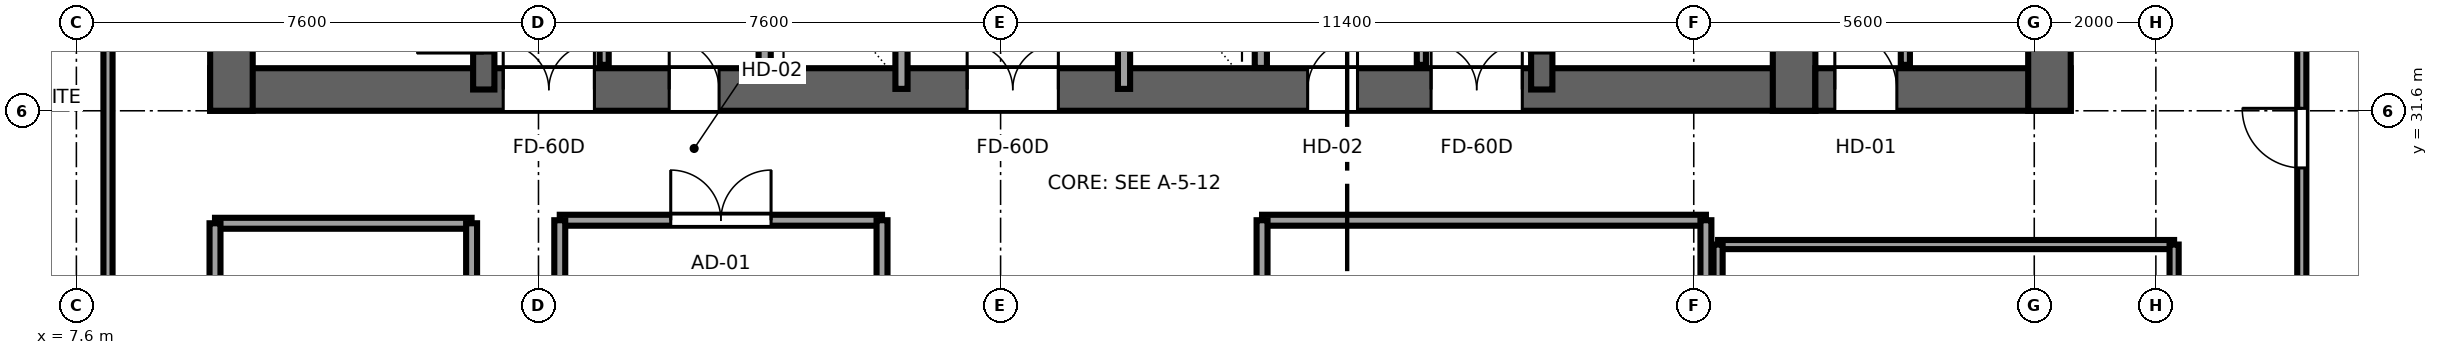
"""IFC4 building model, lengths in metres.
Left out: names, types, materials, properties, quantities, classifications, styles, units other than length and angle.
Written with IfcOpenShell. Run it as: python <this file> out.ifc"""

import sys

from ifc_helpers import new_model, si_unit, direction, frame, frame_2d, origin, place, context, subcontext, project, spatial, rectangle, extrude, source, transform, mapped, element, fill, save


model = new_model("IFC4")
c1 = context("Model", 3, precision=1e-05, world=origin(), true_north=direction((0.0, 1.0)))
c2 = subcontext(c1, "Body", "Model", "MODEL_VIEW")
j1 = project(units=[si_unit("LENGTHUNIT", "METRE"), si_unit("PLANEANGLEUNIT", "RADIAN")], contexts=[c1])
p1 = place(None, origin())
s1 = spatial("IfcSite", under=j1, at=p1, CompositionType="ELEMENT")
p2 = place(p1, origin())
s2 = spatial("IfcBuilding", under=s1, at=p2, CompositionType="ELEMENT")
p3 = place(p2, frame((0.0, 0.0, 179.0)))
s3 = spatial("IfcBuildingStorey", under=s2, at=p3, CompositionType="ELEMENT", Elevation=179.0)
p4 = place(p3, frame((9.8, 31.95, 0.0), z_axis=(0.0, 0.0, 1.0), x_axis=(1.0, 0.0, 0.0)))
e1 = element("IfcWall", 1, at=p4, inside=s3, PredefinedType="SHEAR", context=c2, shape_type="SweptSolid", body=[
    extrude(rectangle(XDim=26.4, YDim=0.7, at=frame_2d((13.2, 0.0))), origin(), (0.0, 0.0, 1.0), 3.55),
])
p5 = place(p4, frame((6.32, 0.0, 0.0), z_axis=(0.0, 0.0, 1.0), x_axis=(-1.0, 0.0, 0.0)))
e2 = element("IfcOpeningElement", 2, at=p5, cuts=e1, PredefinedType="OPENING", context=c2, shape_type="SweptSolid", body=[
    extrude(rectangle(XDim=1.5, YDim=2.04, at=frame_2d((0.75, 1.02))), frame((0.0, 0.36, 0.0), z_axis=(0.0, -1.0, 0.0), x_axis=(1.0, 0.0, 0.0)), (0.0, 0.0, 1.0), 0.72),
])
p6 = place(p4, frame((13.95, 0.0, 0.0), z_axis=(0.0, 0.0, 1.0), x_axis=(-1.0, 0.0, 0.0)))
e3 = element("IfcOpeningElement", 3, at=p6, cuts=e1, PredefinedType="OPENING", context=c2, shape_type="SweptSolid", body=[
    extrude(rectangle(XDim=1.5, YDim=2.04, at=frame_2d((0.75, 1.02))), frame((0.0, 0.36, 0.0), z_axis=(0.0, -1.0, 0.0), x_axis=(1.0, 0.0, 0.0)), (0.0, 0.0, 1.0), 0.72),
])
p7 = place(p4, frame((21.58, 0.0, 0.0), z_axis=(0.0, 0.0, 1.0), x_axis=(-1.0, 0.0, 0.0)))
e4 = element("IfcOpeningElement", 4, at=p7, cuts=e1, PredefinedType="OPENING", context=c2, shape_type="SweptSolid", body=[
    extrude(rectangle(XDim=1.5, YDim=2.04, at=frame_2d((0.75, 1.02))), frame((0.0, 0.36, 0.0), z_axis=(0.0, -1.0, 0.0), x_axis=(1.0, 0.0, 0.0)), (0.0, 0.0, 1.0), 0.72),
])
p8 = place(p4, frame((8.37, 0.0, 0.0), z_axis=(0.0, 0.0, 1.0), x_axis=(-1.0, 0.0, 0.0)))
e5 = element("IfcOpeningElement", 5, at=p8, cuts=e1, PredefinedType="OPENING", context=c2, shape_type="SweptSolid", body=[
    extrude(rectangle(XDim=0.82, YDim=2.01, at=frame_2d((0.41, 1.005))), frame((0.0, 0.36, 0.0), z_axis=(0.0, -1.0, 0.0), x_axis=(1.0, 0.0, 0.0)), (0.0, 0.0, 1.0), 0.72),
])
p9 = place(p4, frame((18.87, 0.0, 0.0), z_axis=(0.0, 0.0, 1.0), x_axis=(-1.0, 0.0, 0.0)))
e6 = element("IfcOpeningElement", 6, at=p9, cuts=e1, PredefinedType="OPENING", context=c2, shape_type="SweptSolid", body=[
    extrude(rectangle(XDim=0.82, YDim=2.01, at=frame_2d((0.41, 1.005))), frame((0.0, 0.36, 0.0), z_axis=(0.0, -1.0, 0.0), x_axis=(1.0, 0.0, 0.0)), (0.0, 0.0, 1.0), 0.72),
])
for number, where, z_axis, x_axis in (
    (7, (10.15, 31.6, 0.0), (0.0, 0.0, 1.0), (0.0, 1.0, 0.0)),
    (8, (35.85, 31.6, 0.0), (0.0, 0.0, 1.0), (0.0, 1.0, 0.0)),
):
    element("IfcWall", number, at=place(p3, frame(where, z_axis=z_axis, x_axis=x_axis)), inside=s3, PredefinedType="SHEAR", context=c2, shape_type="SweptSolid", body=[
        extrude(rectangle(XDim=13.6, YDim=0.7, at=frame_2d((6.8, 0.0))), origin(), (0.0, 0.0, 1.0), 3.55),
    ])
p10 = place(p3, frame((14.3, 31.95, 0.0), z_axis=(0.0, 0.0, 1.0), x_axis=(0.0, 1.0, 0.0)))
e9 = element("IfcWall", 9, at=p10, inside=s3, PredefinedType="SHEAR", context=c2, shape_type="SweptSolid", body=[
    extrude(rectangle(XDim=12.9, YDim=0.35, at=frame_2d((6.45, 0.0))), origin(), (0.0, 0.0, 1.0), 3.55),
])
p11 = place(p10, frame((0.6, 0.0, 0.0)))
e10 = element("IfcOpeningElement", 10, at=p11, cuts=e9, PredefinedType="OPENING", context=c2, shape_type="SweptSolid", body=[
    extrude(rectangle(XDim=1.1, YDim=2.12, at=frame_2d((0.55, 1.06))), frame((0.0, 0.185, 0.0), z_axis=(0.0, -1.0, 0.0), x_axis=(1.0, 0.0, 0.0)), (0.0, 0.0, 1.0), 0.37),
])
p12 = place(p3, frame((31.7, 31.95, 0.0), z_axis=(0.0, 0.0, 1.0), x_axis=(0.0, 1.0, 0.0)))
e11 = element("IfcWall", 11, at=p12, inside=s3, PredefinedType="SHEAR", context=c2, shape_type="SweptSolid", body=[
    extrude(rectangle(XDim=12.9, YDim=0.35, at=frame_2d((6.45, 0.0))), origin(), (0.0, 0.0, 1.0), 3.55),
])
p13 = place(p12, frame((1.7, 0.0, 0.0), z_axis=(0.0, 0.0, 1.0), x_axis=(-1.0, 0.0, 0.0)))
e12 = element("IfcOpeningElement", 12, at=p13, cuts=e11, PredefinedType="OPENING", context=c2, shape_type="SweptSolid", body=[
    extrude(rectangle(XDim=1.1, YDim=2.12, at=frame_2d((0.55, 1.06))), frame((0.0, 0.185, 0.0), z_axis=(0.0, -1.0, 0.0), x_axis=(1.0, 0.0, 0.0)), (0.0, 0.0, 1.0), 0.37),
])
p14 = place(p3, frame((36.2, 31.95, 0.0), z_axis=(0.0, 0.0, 1.0), x_axis=(1.0, 0.0, 0.0)))
e13 = element("IfcWall", 13, at=p14, inside=s3, PredefinedType="SHEAR", context=c2, shape_type="SweptSolid", body=[
    extrude(rectangle(XDim=4.2, YDim=0.7, at=frame_2d((2.1, 0.0))), origin(), (0.0, 0.0, 1.0), 3.55),
])
p15 = place(p14, frame((1.34, 0.0, 0.0), z_axis=(0.0, 0.0, 1.0), x_axis=(-1.0, 0.0, 0.0)))
e14 = element("IfcOpeningElement", 14, at=p15, cuts=e13, PredefinedType="OPENING", context=c2, shape_type="SweptSolid", body=[
    extrude(rectangle(XDim=1.02, YDim=2.03, at=frame_2d((0.51, 1.015))), frame((0.0, 0.36, 0.0), z_axis=(0.0, -1.0, 0.0), x_axis=(1.0, 0.0, 0.0)), (0.0, 0.0, 1.0), 0.72),
])
p16 = place(p3, frame((40.05, 31.6, 0.0), z_axis=(0.0, 0.0, 1.0), x_axis=(0.0, 1.0, 0.0)))
e15 = element("IfcWall", 15, at=p16, inside=s3, PredefinedType="SHEAR", context=c2, shape_type="SweptSolid", body=[
    extrude(rectangle(XDim=13.6, YDim=0.7, at=frame_2d((6.8, 0.0))), origin(), (0.0, 0.0, 1.0), 3.55),
])
for number, where, z_axis, x_axis in (
    (16, (18.92, 32.304, 0.0), (0.0, 0.0, 1.0), (0.0, 1.0, 0.0)),
    (17, (27.08, 32.304, 0.0), (0.0, 0.0, 1.0), (0.0, 1.0, 0.0)),
):
    element("IfcWall", number, at=place(p3, frame(where, z_axis=z_axis, x_axis=x_axis)), inside=s3, PredefinedType="SOLIDWALL", context=c2, shape_type="SweptSolid", body=[
        extrude(rectangle(XDim=3.846, YDim=0.2, at=frame_2d((1.923, 0.0))), origin(), (0.0, 0.0, 1.0), 3.25),
    ])
p17 = place(p3, frame((21.17, 31.96, 0.0), z_axis=(0.0, 0.0, 1.0), x_axis=(0.0, 1.0, 0.0)))
e18 = element("IfcWall", 18, at=p17, inside=s3, PredefinedType="SOLIDWALL", context=c2, shape_type="SweptSolid", body=[
    extrude(rectangle(XDim=12.58, YDim=0.2, at=frame_2d((6.29, 0.0))), origin(), (0.0, 0.0, 1.0), 3.25),
])
p18 = place(p17, frame((5.74, 0.0, 0.0)))
e19 = element("IfcOpeningElement", 19, at=p18, cuts=e18, PredefinedType="OPENING", context=c2, shape_type="SweptSolid", body=[
    extrude(rectangle(XDim=1.1, YDim=2.12, at=frame_2d((0.55, 1.06))), frame((0.0, 0.11, 0.0), z_axis=(0.0, -1.0, 0.0), x_axis=(1.0, 0.0, 0.0)), (0.0, 0.0, 1.0), 0.22),
])
p19 = place(p17, frame((8.24, 0.0, 0.0)))
e20 = element("IfcOpeningElement", 20, at=p19, cuts=e18, PredefinedType="OPENING", context=c2, shape_type="SweptSolid", body=[
    extrude(rectangle(XDim=1.1, YDim=2.12, at=frame_2d((0.55, 1.06))), frame((0.0, 0.11, 0.0), z_axis=(0.0, -1.0, 0.0), x_axis=(1.0, 0.0, 0.0)), (0.0, 0.0, 1.0), 0.22),
])
p20 = place(p3, frame((24.83, 31.96, 0.0), z_axis=(0.0, 0.0, 1.0), x_axis=(0.0, 1.0, 0.0)))
e21 = element("IfcWall", 21, at=p20, inside=s3, PredefinedType="SOLIDWALL", context=c2, shape_type="SweptSolid", body=[
    extrude(rectangle(XDim=12.58, YDim=0.2, at=frame_2d((6.29, 0.0))), origin(), (0.0, 0.0, 1.0), 3.25),
])
p21 = place(p20, frame((5.74, 0.0, 0.0)))
e22 = element("IfcOpeningElement", 22, at=p21, cuts=e21, PredefinedType="OPENING", context=c2, shape_type="SweptSolid", body=[
    extrude(rectangle(XDim=1.1, YDim=2.12, at=frame_2d((0.55, 1.06))), frame((0.0, 0.11, 0.0), z_axis=(0.0, -1.0, 0.0), x_axis=(1.0, 0.0, 0.0)), (0.0, 0.0, 1.0), 0.22),
])
p22 = place(p20, frame((8.24, 0.0, 0.0)))
e23 = element("IfcOpeningElement", 23, at=p22, cuts=e21, PredefinedType="OPENING", context=c2, shape_type="SweptSolid", body=[
    extrude(rectangle(XDim=1.1, YDim=2.12, at=frame_2d((0.55, 1.06))), frame((0.0, 0.11, 0.0), z_axis=(0.0, -1.0, 0.0), x_axis=(1.0, 0.0, 0.0)), (0.0, 0.0, 1.0), 0.22),
])
for number, where, z_axis, x_axis in (
    (24, (16.28, 32.355, 0.0), (0.0, 0.0, 1.0), (0.0, 1.0, 0.0)),
    (25, (29.72, 32.355, 0.0), (0.0, 0.0, 1.0), (0.0, 1.0, 0.0)),
):
    element("IfcWall", number, at=place(p3, frame(where, z_axis=z_axis, x_axis=x_axis)), inside=s3, PredefinedType="PARTITIONING", context=c2, shape_type="SweptSolid", body=[
        extrude(rectangle(XDim=0.865, YDim=0.15, at=frame_2d((0.433, 0.0))), origin(), (0.0, 0.0, 1.0), 3.25),
    ])
p23 = place(p3, frame((37.68, 32.355, 0.0), z_axis=(0.0, 0.0, 1.0), x_axis=(0.0, 1.0, 0.0)))
e26 = element("IfcWall", 26, at=p23, inside=s3, PredefinedType="PARTITIONING", context=c2, shape_type="SweptSolid", body=[
    extrude(rectangle(XDim=7.845, YDim=0.15, at=frame_2d((3.922, 0.0))), origin(), (0.0, 0.0, 1.0), 3.25),
])
p24 = place(p23, frame((3.413, 0.0, 0.0)))
e27 = element("IfcOpeningElement", 27, at=p24, cuts=e26, PredefinedType="OPENING", context=c2, shape_type="SweptSolid", body=[
    extrude(rectangle(XDim=1.02, YDim=2.03, at=frame_2d((0.51, 1.015))), frame((0.0, 0.085, 0.0), z_axis=(0.0, -1.0, 0.0), x_axis=(1.0, 0.0, 0.0)), (0.0, 0.0, 1.0), 0.17),
])
p25 = place(p3, frame((8.12, 20.78, 0.0), z_axis=(0.0, 0.0, 1.0), x_axis=(0.0, 1.0, 0.0)))
e28 = element("IfcWall", 28, at=p25, inside=s3, PredefinedType="PARTITIONING", context=c2, shape_type="SweptSolid", body=[
    extrude(rectangle(XDim=13.54, YDim=0.15, at=frame_2d((6.77, 0.0))), origin(), (0.0, 0.0, 1.0), 3.25),
])
p26 = place(p25, frame((6.28, 0.0, 0.0)))
e29 = element("IfcOpeningElement", 29, at=p26, cuts=e28, PredefinedType="OPENING", context=c2, shape_type="SweptSolid", body=[
    extrude(rectangle(XDim=0.98, YDim=2.12, at=frame_2d((0.49, 1.06))), frame((0.0, 0.085, 0.0), z_axis=(0.0, -1.0, 0.0), x_axis=(1.0, 0.0, 0.0)), (0.0, 0.0, 1.0), 0.17),
])
p27 = place(p3, frame((44.2, 24.78, 0.0), z_axis=(0.0, 0.0, 1.0), x_axis=(0.0, 1.0, 0.0)))
e30 = element("IfcWall", 30, at=p27, inside=s3, PredefinedType="PARTITIONING", context=c2, shape_type="SweptSolid", body=[
    extrude(rectangle(XDim=12.74, YDim=0.15, at=frame_2d((6.37, 0.0))), origin(), (0.0, 0.0, 1.0), 3.25),
])
p28 = place(p27, frame((5.88, 0.0, 0.0)))
e31 = element("IfcOpeningElement", 31, at=p28, cuts=e30, PredefinedType="OPENING", context=c2, shape_type="SweptSolid", body=[
    extrude(rectangle(XDim=0.98, YDim=2.12, at=frame_2d((0.49, 1.06))), frame((0.0, 0.085, 0.0), z_axis=(0.0, -1.0, 0.0), x_axis=(1.0, 0.0, 0.0)), (0.0, 0.0, 1.0), 0.17),
])
p29 = place(p3, frame((9.88, 29.75, 0.0), z_axis=(0.0, 0.0, 1.0), x_axis=(1.0, 0.0, 0.0)))
e32 = element("IfcWall", 32, at=p29, inside=s3, PredefinedType="PARTITIONING", context=c2, shape_type="SweptSolid", body=[
    extrude(rectangle(XDim=4.22, YDim=0.18, at=frame_2d((2.11, 0.0))), origin(), (0.0, 0.0, 1.0), 3.25),
])
for number, where, z_axis, x_axis in (
    (33, (9.88, 20.7, 0.0), (0.0, 0.0, 1.0), (0.0, 1.0, 0.0)),
    (34, (14.1, 20.7, 0.0), (0.0, 0.0, 1.0), (0.0, 1.0, 0.0)),
):
    element("IfcWall", number, at=place(p3, frame(where, z_axis=z_axis, x_axis=x_axis)), inside=s3, PredefinedType="PARTITIONING", context=c2, shape_type="SweptSolid", body=[
        extrude(rectangle(XDim=9.05, YDim=0.18, at=frame_2d((4.525, 0.0))), origin(), (0.0, 0.0, 1.0), 3.25),
    ])
p30 = place(p3, frame((27.1, 29.8, 0.0), z_axis=(0.0, 0.0, 1.0), x_axis=(1.0, 0.0, 0.0)))
e35 = element("IfcWall", 35, at=p30, inside=s3, PredefinedType="PARTITIONING", context=c2, shape_type="SweptSolid", body=[
    extrude(rectangle(XDim=7.3, YDim=0.18, at=frame_2d((3.65, 0.0))), origin(), (0.0, 0.0, 1.0), 3.25),
])
for number, where, z_axis, x_axis in (
    (36, (27.1, 20.7, 0.0), (0.0, 0.0, 1.0), (0.0, 1.0, 0.0)),
    (37, (34.4, 20.7, 0.0), (0.0, 0.0, 1.0), (0.0, 1.0, 0.0)),
):
    element("IfcWall", number, at=place(p3, frame(where, z_axis=z_axis, x_axis=x_axis)), inside=s3, PredefinedType="PARTITIONING", context=c2, shape_type="SweptSolid", body=[
        extrude(rectangle(XDim=9.1, YDim=0.18, at=frame_2d((4.55, 0.0))), origin(), (0.0, 0.0, 1.0), 3.25),
    ])
p31 = place(p3, frame((15.55, 29.8, 0.0), z_axis=(0.0, 0.0, 1.0), x_axis=(1.0, 0.0, 0.0)))
e38 = element("IfcWall", 38, at=p31, inside=s3, PredefinedType="PARTITIONING", context=c2, shape_type="SweptSolid", body=[
    extrude(rectangle(XDim=5.3, YDim=0.18, at=frame_2d((2.65, 0.0))), origin(), (0.0, 0.0, 1.0), 3.25),
])
p32 = place(p31, frame((1.825, 0.0, 0.0)))
e39 = element("IfcOpeningElement", 39, at=p32, cuts=e38, PredefinedType="OPENING", context=c2, shape_type="SweptSolid", body=[
    extrude(rectangle(XDim=1.65, YDim=2.15, at=frame_2d((0.825, 1.075))), frame((0.0, 0.1, 0.0), z_axis=(0.0, -1.0, 0.0), x_axis=(1.0, 0.0, 0.0)), (0.0, 0.0, 1.0), 0.2),
])
for number, where, z_axis, x_axis in (
    (40, (15.55, 24.92, 0.0), (0.0, 0.0, 1.0), (0.0, 1.0, 0.0)),
    (41, (20.85, 24.92, 0.0), (0.0, 0.0, 1.0), (0.0, 1.0, 0.0)),
):
    element("IfcWall", number, at=place(p3, frame(where, z_axis=z_axis, x_axis=x_axis)), inside=s3, PredefinedType="PARTITIONING", context=c2, shape_type="SweptSolid", body=[
        extrude(rectangle(XDim=4.88, YDim=0.18, at=frame_2d((2.44, 0.0))), origin(), (0.0, 0.0, 1.0), 3.25),
    ])
p33 = place(p3, frame((34.6, 29.4, 0.0), z_axis=(0.0, 0.0, 1.0), x_axis=(1.0, 0.0, 0.0)))
e42 = element("IfcWall", 42, at=p33, inside=s3, PredefinedType="PARTITIONING", context=c2, shape_type="SweptSolid", body=[
    extrude(rectangle(XDim=7.5, YDim=0.15, at=frame_2d((3.75, 0.0))), origin(), (0.0, 0.0, 1.0), 3.25),
])
p34 = place(p3, frame((34.6, 20.7, 0.0), z_axis=(0.0, 0.0, 1.0), x_axis=(0.0, 1.0, 0.0)))
e43 = element("IfcWall", 43, at=p34, inside=s3, PredefinedType="PARTITIONING", context=c2, shape_type="SweptSolid", body=[
    extrude(rectangle(XDim=8.7, YDim=0.15, at=frame_2d((4.35, 0.0))), origin(), (0.0, 0.0, 1.0), 3.25),
])
p35 = place(p3, frame((42.1, 20.7, 0.0), z_axis=(0.0, 0.0, 1.0), x_axis=(0.0, 1.0, 0.0)))
e44 = element("IfcWall", 44, at=p35, inside=s3, PredefinedType="PARTITIONING", context=c2, shape_type="SweptSolid", body=[
    extrude(rectangle(XDim=8.7, YDim=0.15, at=frame_2d((4.35, 0.0))), origin(), (0.0, 0.0, 1.0), 2.04),
])
m1 = source(origin(), c2, "Body", "SweptSolid", [
    extrude(rectangle(XDim=1.1, YDim=2.12, at=frame_2d((0.55, 1.06))), frame((0.0, 0.025, 0.0), z_axis=(0.0, -1.0, 0.0), x_axis=(1.0, 0.0, 0.0)), (0.0, 0.0, 1.0), 0.05),
])
p36 = place(p11, origin())
e45 = element("IfcDoor", 45, at=p36, inside=s3, OperationType="SINGLE_SWING_LEFT", PredefinedType="DOOR", context=c2, shape_type="MappedRepresentation", body=[
    mapped(m1, transform((0.0, 0.0, 0.0), x_axis=(1.0, 0.0, 0.0), y_axis=(0.0, 1.0, 0.0), z_axis=(0.0, 0.0, 1.0), scale=1.0)),
])
fill(e10, e45)
p37 = place(p13, origin())
e46 = element("IfcDoor", 46, at=p37, inside=s3, OperationType="SINGLE_SWING_RIGHT", PredefinedType="DOOR", context=c2, shape_type="MappedRepresentation", body=[
    mapped(m1, transform((0.0, 0.0, 0.0), x_axis=(1.0, 0.0, 0.0), y_axis=(0.0, 1.0, 0.0), z_axis=(0.0, 0.0, 1.0), scale=1.0)),
])
fill(e12, e46)
m2 = source(origin(), c2, "Body", "SweptSolid", [
    extrude(rectangle(XDim=1.5, YDim=2.04, at=frame_2d((0.75, 1.02))), frame((0.0, 0.025, 0.0), z_axis=(0.0, -1.0, 0.0), x_axis=(1.0, 0.0, 0.0)), (0.0, 0.0, 1.0), 0.05),
])
p38 = place(p5, origin())
e47 = element("IfcDoor", 47, at=p38, inside=s3, OperationType="DOUBLE_DOOR_SINGLE_SWING", PredefinedType="DOOR", context=c2, shape_type="MappedRepresentation", body=[
    mapped(m2, transform((0.0, 0.0, 0.0), x_axis=(1.0, 0.0, 0.0), y_axis=(0.0, 1.0, 0.0), z_axis=(0.0, 0.0, 1.0), scale=1.0)),
])
fill(e2, e47)
p39 = place(p6, origin())
e48 = element("IfcDoor", 48, at=p39, inside=s3, OperationType="DOUBLE_DOOR_SINGLE_SWING", PredefinedType="DOOR", context=c2, shape_type="MappedRepresentation", body=[
    mapped(m2, transform((0.0, 0.0, 0.0), x_axis=(1.0, 0.0, 0.0), y_axis=(0.0, 1.0, 0.0), z_axis=(0.0, 0.0, 1.0), scale=1.0)),
])
fill(e3, e48)
p40 = place(p7, origin())
e49 = element("IfcDoor", 49, at=p40, inside=s3, OperationType="DOUBLE_DOOR_SINGLE_SWING", PredefinedType="DOOR", context=c2, shape_type="MappedRepresentation", body=[
    mapped(m2, transform((0.0, 0.0, 0.0), x_axis=(1.0, 0.0, 0.0), y_axis=(0.0, 1.0, 0.0), z_axis=(0.0, 0.0, 1.0), scale=1.0)),
])
fill(e4, e49)
m3 = source(origin(), c2, "Body", "SweptSolid", [
    extrude(rectangle(XDim=0.82, YDim=2.01, at=frame_2d((0.41, 1.005))), frame((0.0, 0.025, 0.0), z_axis=(0.0, -1.0, 0.0), x_axis=(1.0, 0.0, 0.0)), (0.0, 0.0, 1.0), 0.05),
])
p41 = place(p8, origin())
e50 = element("IfcDoor", 50, at=p41, inside=s3, OperationType="SINGLE_SWING_LEFT", PredefinedType="DOOR", context=c2, shape_type="MappedRepresentation", body=[
    mapped(m3, transform((0.0, 0.0, 0.0), x_axis=(1.0, 0.0, 0.0), y_axis=(0.0, 1.0, 0.0), z_axis=(0.0, 0.0, 1.0), scale=1.0)),
])
fill(e5, e50)
p42 = place(p9, origin())
e51 = element("IfcDoor", 51, at=p42, inside=s3, OperationType="SINGLE_SWING_RIGHT", PredefinedType="DOOR", context=c2, shape_type="MappedRepresentation", body=[
    mapped(m3, transform((0.0, 0.0, 0.0), x_axis=(1.0, 0.0, 0.0), y_axis=(0.0, 1.0, 0.0), z_axis=(0.0, 0.0, 1.0), scale=1.0)),
])
fill(e6, e51)
m4 = source(origin(), c2, "Body", "SweptSolid", [
    extrude(rectangle(XDim=1.02, YDim=2.03, at=frame_2d((0.51, 1.015))), frame((0.0, 0.025, 0.0), z_axis=(0.0, -1.0, 0.0), x_axis=(1.0, 0.0, 0.0)), (0.0, 0.0, 1.0), 0.05),
])
p43 = place(p15, origin())
e52 = element("IfcDoor", 52, at=p43, inside=s3, OperationType="SINGLE_SWING_LEFT", PredefinedType="DOOR", context=c2, shape_type="MappedRepresentation", body=[
    mapped(m4, transform((0.0, 0.0, 0.0), x_axis=(1.0, 0.0, 0.0), y_axis=(0.0, 1.0, 0.0), z_axis=(0.0, 0.0, 1.0), scale=1.0)),
])
fill(e14, e52)
m5 = source(origin(), c2, "Body", "SweptSolid", [
    extrude(rectangle(XDim=0.98, YDim=2.12, at=frame_2d((0.49, 1.06))), frame((0.0, 0.025, 0.0), z_axis=(0.0, -1.0, 0.0), x_axis=(1.0, 0.0, 0.0)), (0.0, 0.0, 1.0), 0.05),
])
p44 = place(p28, origin())
e53 = element("IfcDoor", 53, at=p44, inside=s3, OperationType="SINGLE_SWING_RIGHT", PredefinedType="DOOR", context=c2, shape_type="MappedRepresentation", body=[
    mapped(m5, transform((0.0, 0.0, 0.0), x_axis=(1.0, 0.0, 0.0), y_axis=(0.0, 1.0, 0.0), z_axis=(0.0, 0.0, 1.0), scale=1.0)),
])
fill(e31, e53)
m6 = source(origin(), c2, "Body", "SweptSolid", [
    extrude(rectangle(XDim=1.65, YDim=2.15, at=frame_2d((0.825, 1.075))), frame((0.0, 0.025, 0.0), z_axis=(0.0, -1.0, 0.0), x_axis=(1.0, 0.0, 0.0)), (0.0, 0.0, 1.0), 0.05),
])
p45 = place(p32, origin())
e54 = element("IfcDoor", 54, at=p45, inside=s3, OperationType="DOUBLE_DOOR_SINGLE_SWING", PredefinedType="DOOR", context=c2, shape_type="MappedRepresentation", body=[
    mapped(m6, transform((0.0, 0.0, 0.0), x_axis=(1.0, 0.0, 0.0), y_axis=(0.0, 1.0, 0.0), z_axis=(0.0, 0.0, 1.0), scale=1.0)),
])
fill(e39, e54)
save(model, sys.argv[1])
